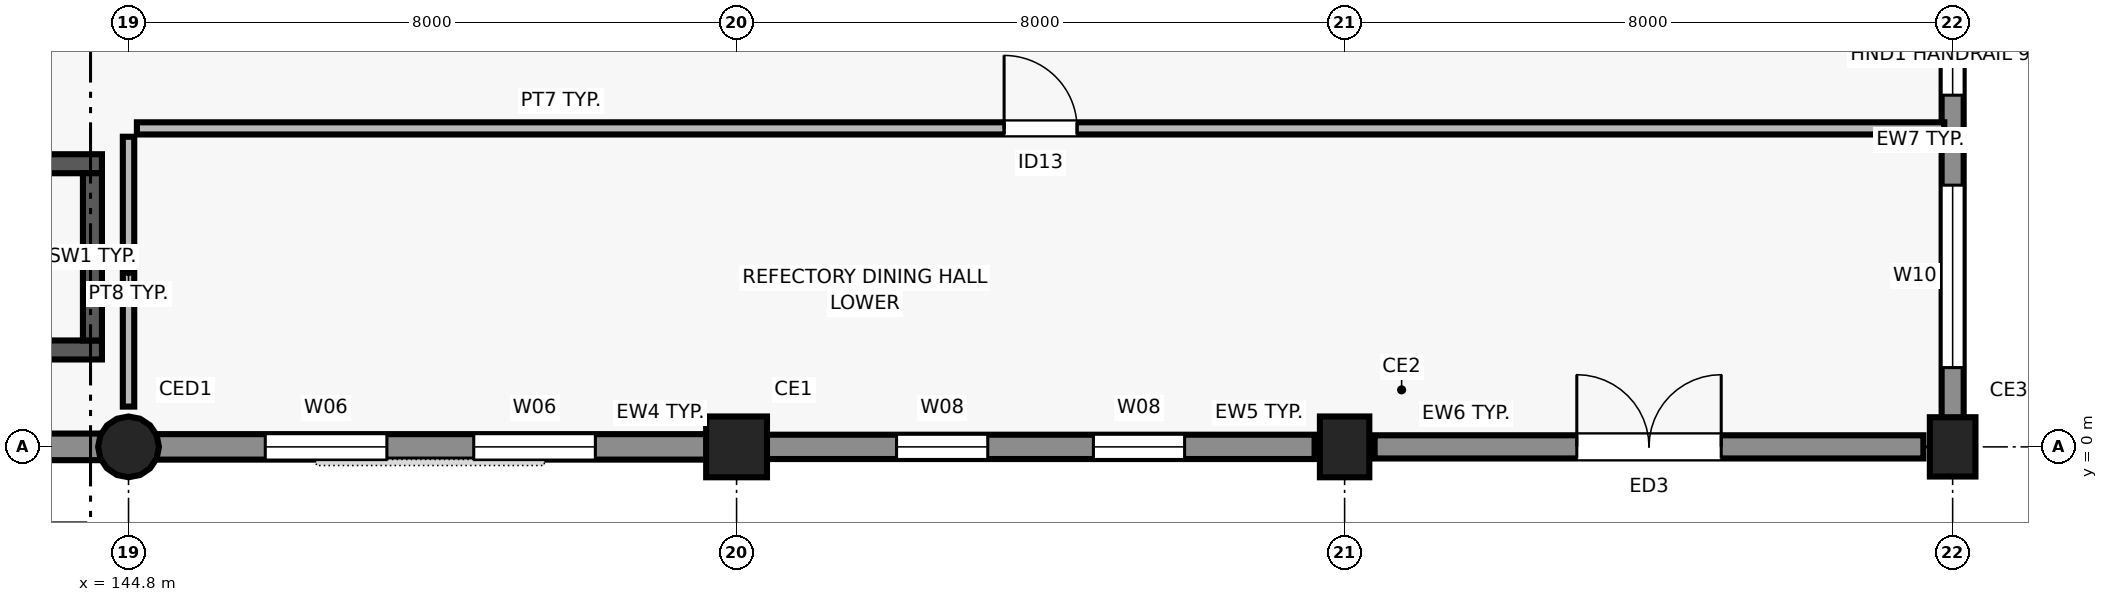
"""IFC4 building model, lengths in metres.
Left out: names, types, materials, properties, quantities, classifications, styles, units other than length and angle.
Written with IfcOpenShell. Run it as: python <this file> out.ifc"""

import sys

from ifc_helpers import new_model, si_unit, direction, frame, frame_2d, origin, origin_2d, place, context, subcontext, project, spatial, rectangle, circle, extrude, element, fill, save


model = new_model("IFC4")
c1 = context("Model", 3, precision=1e-05, world=origin(), true_north=direction((0.0, 1.0)))
c2 = subcontext(c1, "Body", "Model", "MODEL_VIEW")
j1 = project(units=[si_unit("LENGTHUNIT", "METRE"), si_unit("PLANEANGLEUNIT", "RADIAN")], contexts=[c1])
p1 = place(None, origin())
s1 = spatial("IfcSite", under=j1, at=p1, CompositionType="ELEMENT")
p2 = place(p1, origin())
s2 = spatial("IfcBuilding", under=s1, at=p2, CompositionType="ELEMENT")
p3 = place(p2, frame((0.0, 0.0, -4.2)))
s3 = spatial("IfcBuildingStorey", under=s2, at=p3, CompositionType="ELEMENT", Elevation=-4.2)
p4 = place(p3, frame((144.8, 0.0, 0.0), z_axis=(0.0, 0.0, 1.0), x_axis=(1.0, 0.0, 0.0)))
e1 = element("IfcColumn", 1, at=p4, inside=s3, PredefinedType="COLUMN", context=c2, shape_type="SweptSolid", body=[
    extrude(circle(Radius=0.4, at=origin_2d()), origin(), (0.0, 0.0, 1.0), 4.2),
])
p5 = place(p3, frame((152.8, 0.0, 0.0), z_axis=(0.0, 0.0, 1.0), x_axis=(1.0, 0.0, 0.0)))
e2 = element("IfcColumn", 2, at=p5, inside=s3, PredefinedType="COLUMN", context=c2, shape_type="SweptSolid", body=[
    extrude(rectangle(XDim=0.8, YDim=0.8, at=origin_2d()), origin(), (0.0, 0.0, 1.0), 4.2),
])
p6 = place(p3, frame((160.8, 0.0, 0.0), z_axis=(0.0, 0.0, 1.0), x_axis=(1.0, 0.0, 0.0)))
e3 = element("IfcColumn", 3, at=p6, inside=s3, PredefinedType="COLUMN", context=c2, shape_type="SweptSolid", body=[
    extrude(rectangle(XDim=0.8, YDim=0.65, at=origin_2d()), origin(), (0.0, 0.0, 1.0), 4.2),
])
p7 = place(p3, frame((168.8, 0.0, 0.0), z_axis=(0.0, 0.0, 1.0), x_axis=(1.0, 0.0, 0.0)))
e4 = element("IfcColumn", 4, at=p7, inside=s3, PredefinedType="COLUMN", context=c2, shape_type="SweptSolid", body=[
    extrude(rectangle(XDim=0.78, YDim=0.6, at=origin_2d()), origin(), (0.0, 0.0, 1.0), 4.2),
])
p8 = place(p3, frame((137.185, 0.0, 0.0), z_axis=(0.0, 0.0, 1.0), x_axis=(1.0, 0.0, 0.0)))
e5 = element("IfcWall", 5, at=p8, inside=s3, PredefinedType="SOLIDWALL", context=c2, shape_type="SweptSolid", body=[
    extrude(rectangle(XDim=7.279, YDim=0.35, at=frame_2d((3.64, 0.0))), origin(), (0.0, 0.0, 1.0), 3.92),
])
p9 = place(p8, frame((1.2, 0.0, 0.9)))
e6 = element("IfcOpeningElement", 6, at=p9, cuts=e5, PredefinedType="OPENING", context=c2, shape_type="SweptSolid", body=[
    extrude(rectangle(XDim=2.0, YDim=1.8, at=frame_2d((1.0, 0.9))), frame((0.0, 0.185, 0.0), z_axis=(0.0, -1.0, 0.0), x_axis=(1.0, 0.0, 0.0)), (0.0, 0.0, 1.0), 0.37),
])
p10 = place(p8, frame((4.079, 0.0, 0.9)))
e7 = element("IfcOpeningElement", 7, at=p10, cuts=e5, PredefinedType="OPENING", context=c2, shape_type="SweptSolid", body=[
    extrude(rectangle(XDim=2.0, YDim=1.8, at=frame_2d((1.0, 0.9))), frame((0.0, 0.185, 0.0), z_axis=(0.0, -1.0, 0.0), x_axis=(1.0, 0.0, 0.0)), (0.0, 0.0, 1.0), 0.37),
])
p11 = place(p3, frame((145.136, 0.0, 0.0), z_axis=(0.0, 0.0, 1.0), x_axis=(1.0, 0.0, 0.0)))
e8 = element("IfcWall", 8, at=p11, inside=s3, PredefinedType="SOLIDWALL", context=c2, shape_type="SweptSolid", body=[
    extrude(rectangle(XDim=7.269, YDim=0.335, at=frame_2d((3.635, 0.0))), origin(), (0.0, 0.0, 1.0), 3.115),
])
p12 = place(p11, frame((1.463, 0.0, 0.9)))
e9 = element("IfcOpeningElement", 9, at=p12, cuts=e8, PredefinedType="OPENING", context=c2, shape_type="SweptSolid", body=[
    extrude(rectangle(XDim=1.6, YDim=1.8, at=frame_2d((0.8, 0.9))), frame((0.0, 0.177, 0.0), z_axis=(0.0, -1.0, 0.0), x_axis=(1.0, 0.0, 0.0)), (0.0, 0.0, 1.0), 0.355),
])
p13 = place(p11, frame((4.206, 0.0, 0.9)))
e10 = element("IfcOpeningElement", 10, at=p13, cuts=e8, PredefinedType="OPENING", context=c2, shape_type="SweptSolid", body=[
    extrude(rectangle(XDim=1.6, YDim=1.8, at=frame_2d((0.8, 0.9))), frame((0.0, 0.177, 0.0), z_axis=(0.0, -1.0, 0.0), x_axis=(1.0, 0.0, 0.0)), (0.0, 0.0, 1.0), 0.355),
])
p14 = place(p3, frame((153.195, 0.0, 0.0), z_axis=(0.0, 0.0, 1.0), x_axis=(1.0, 0.0, 0.0)))
e11 = element("IfcWall", 11, at=p14, inside=s3, PredefinedType="SOLIDWALL", context=c2, shape_type="SweptSolid", body=[
    extrude(rectangle(XDim=7.21, YDim=0.32, at=frame_2d((3.605, 0.0))), origin(), (0.0, 0.0, 1.0), 3.245),
])
p15 = place(p14, frame((1.71, 0.0, 0.9)))
e12 = element("IfcOpeningElement", 12, at=p15, cuts=e11, PredefinedType="OPENING", context=c2, shape_type="SweptSolid", body=[
    extrude(rectangle(XDim=1.2, YDim=1.8, at=frame_2d((0.6, 0.9))), frame((0.0, 0.17, 0.0), z_axis=(0.0, -1.0, 0.0), x_axis=(1.0, 0.0, 0.0)), (0.0, 0.0, 1.0), 0.34),
])
p16 = place(p14, frame((4.3, 0.0, 0.9)))
e13 = element("IfcOpeningElement", 13, at=p16, cuts=e11, PredefinedType="OPENING", context=c2, shape_type="SweptSolid", body=[
    extrude(rectangle(XDim=1.2, YDim=1.8, at=frame_2d((0.6, 0.9))), frame((0.0, 0.17, 0.0), z_axis=(0.0, -1.0, 0.0), x_axis=(1.0, 0.0, 0.0)), (0.0, 0.0, 1.0), 0.34),
])
p17 = place(p3, frame((161.195, 0.0, 0.0), z_axis=(0.0, 0.0, 1.0), x_axis=(1.0, 0.0, 0.0)))
e14 = element("IfcWall", 14, at=p17, inside=s3, PredefinedType="SOLIDWALL", context=c2, shape_type="SweptSolid", body=[
    extrude(rectangle(XDim=7.22, YDim=0.305, at=frame_2d((3.61, 0.0))), origin(), (0.0, 0.0, 1.0), 3.115),
])
p18 = place(p17, frame((2.66, 0.0, 0.0)))
e15 = element("IfcOpeningElement", 15, at=p18, cuts=e14, PredefinedType="OPENING", context=c2, shape_type="SweptSolid", body=[
    extrude(rectangle(XDim=1.9, YDim=2.35, at=frame_2d((0.95, 1.175))), frame((0.0, 0.162, 0.0), z_axis=(0.0, -1.0, 0.0), x_axis=(1.0, 0.0, 0.0)), (0.0, 0.0, 1.0), 0.325),
])
p19 = place(p3, frame((168.8, 0.295, 0.0), z_axis=(0.0, 0.0, 1.0), x_axis=(0.0, 1.0, 0.0)))
e16 = element("IfcWall", 16, at=p19, inside=s3, PredefinedType="SOLIDWALL", context=c2, shape_type="SweptSolid", body=[
    extrude(rectangle(XDim=6.969, YDim=0.29, at=frame_2d((3.484, 0.0))), origin(), (0.0, 0.0, 1.0), 3.355),
])
p20 = place(p19, frame((0.748, 0.0, 0.9)))
e17 = element("IfcOpeningElement", 17, at=p20, cuts=e16, PredefinedType="OPENING", context=c2, shape_type="SweptSolid", body=[
    extrude(rectangle(XDim=2.4, YDim=1.5, at=frame_2d((1.2, 0.75))), frame((0.0, 0.155, 0.0), z_axis=(0.0, -1.0, 0.0), x_axis=(1.0, 0.0, 0.0)), (0.0, 0.0, 1.0), 0.31),
])
p21 = place(p19, frame((4.332, 0.0, 0.9)))
e18 = element("IfcOpeningElement", 18, at=p21, cuts=e16, PredefinedType="OPENING", context=c2, shape_type="SweptSolid", body=[
    extrude(rectangle(XDim=2.2, YDim=1.5, at=frame_2d((1.1, 0.75))), frame((0.0, 0.155, 0.0), z_axis=(0.0, -1.0, 0.0), x_axis=(1.0, 0.0, 0.0)), (0.0, 0.0, 1.0), 0.31),
])
p22 = place(p3, frame((141.95, 1.275, 0.0), z_axis=(0.0, 0.0, 1.0), x_axis=(1.0, 0.0, 0.0)))
e19 = element("IfcWall", 19, at=p22, inside=s3, PredefinedType="SHEAR", context=c2, shape_type="SweptSolid", body=[
    extrude(rectangle(XDim=2.5, YDim=0.25, at=frame_2d((1.25, 0.0))), origin(), (0.0, 0.0, 1.0), 3.92),
])
p23 = place(p3, frame((141.95, 3.725, 0.0), z_axis=(0.0, 0.0, 1.0), x_axis=(1.0, 0.0, 0.0)))
e20 = element("IfcWall", 20, at=p23, inside=s3, PredefinedType="SHEAR", context=c2, shape_type="SweptSolid", body=[
    extrude(rectangle(XDim=2.5, YDim=0.25, at=frame_2d((1.25, 0.0))), origin(), (0.0, 0.0, 1.0), 3.92),
])
p24 = place(p23, frame((0.8, 0.0, 0.0)))
e21 = element("IfcOpeningElement", 21, at=p24, cuts=e20, PredefinedType="OPENING", context=c2, shape_type="SweptSolid", body=[
    extrude(rectangle(XDim=0.9, YDim=2.05, at=frame_2d((0.45, 1.025))), frame((0.0, 0.135, 0.0), z_axis=(0.0, -1.0, 0.0), x_axis=(1.0, 0.0, 0.0)), (0.0, 0.0, 1.0), 0.27),
])
p25 = place(p3, frame((144.325, 1.4, 0.0), z_axis=(0.0, 0.0, 1.0), x_axis=(0.0, 1.0, 0.0)))
e22 = element("IfcWall", 22, at=p25, inside=s3, PredefinedType="SHEAR", context=c2, shape_type="SweptSolid", body=[
    extrude(rectangle(XDim=2.2, YDim=0.25, at=frame_2d((1.1, 0.0))), origin(), (0.0, 0.0, 1.0), 3.92),
])
p26 = place(p3, frame((144.91, 4.19, 0.0), z_axis=(0.0, 0.0, 1.0), x_axis=(1.0, 0.0, 0.0)))
e23 = element("IfcWall", 23, at=p26, inside=s3, PredefinedType="PARTITIONING", context=c2, shape_type="SweptSolid", body=[
    extrude(rectangle(XDim=23.78, YDim=0.16, at=frame_2d((11.89, 0.0))), origin(), (0.0, 0.0, 1.0), 3.9),
])
p27 = place(p26, frame((11.41, 0.0, 0.0)))
e24 = element("IfcOpeningElement", 24, at=p27, cuts=e23, PredefinedType="OPENING", context=c2, shape_type="SweptSolid", body=[
    extrude(rectangle(XDim=0.96, YDim=2.15, at=frame_2d((0.48, 1.075))), frame((0.0, 0.09, 0.0), z_axis=(0.0, -1.0, 0.0), x_axis=(1.0, 0.0, 0.0)), (0.0, 0.0, 1.0), 0.18),
])
p28 = place(p3, frame((144.8, 0.53, 0.0), z_axis=(0.0, 0.0, 1.0), x_axis=(0.0, 1.0, 0.0)))
e25 = element("IfcWall", 25, at=p28, inside=s3, PredefinedType="PARTITIONING", context=c2, shape_type="SweptSolid", body=[
    extrude(rectangle(XDim=3.55, YDim=0.15, at=frame_2d((1.775, 0.0))), origin(), (0.0, 0.0, 1.0), 3.345),
])
p29 = place(p12, origin())
e26 = element("IfcWindow", 26, at=p29, inside=s3, PartitioningType="SINGLE_PANEL", PredefinedType="WINDOW", context=c2, shape_type="SweptSolid", body=[
    extrude(rectangle(XDim=1.6, YDim=1.8, at=frame_2d((0.8, 0.9))), frame((0.0, 0.03, 0.0), z_axis=(0.0, -1.0, 0.0), x_axis=(1.0, 0.0, 0.0)), (0.0, 0.0, 1.0), 0.06),
])
fill(e9, e26)
p30 = place(p13, origin())
e27 = element("IfcWindow", 27, at=p30, inside=s3, PartitioningType="SINGLE_PANEL", PredefinedType="WINDOW", context=c2, shape_type="SweptSolid", body=[
    extrude(rectangle(XDim=1.6, YDim=1.8, at=frame_2d((0.8, 0.9))), frame((0.0, 0.03, 0.0), z_axis=(0.0, -1.0, 0.0), x_axis=(1.0, 0.0, 0.0)), (0.0, 0.0, 1.0), 0.06),
])
fill(e10, e27)
p31 = place(p15, origin())
e28 = element("IfcWindow", 28, at=p31, inside=s3, PartitioningType="SINGLE_PANEL", PredefinedType="WINDOW", context=c2, shape_type="SweptSolid", body=[
    extrude(rectangle(XDim=1.2, YDim=1.8, at=frame_2d((0.6, 0.9))), frame((0.0, 0.03, 0.0), z_axis=(0.0, -1.0, 0.0), x_axis=(1.0, 0.0, 0.0)), (0.0, 0.0, 1.0), 0.06),
])
fill(e12, e28)
p32 = place(p16, origin())
e29 = element("IfcWindow", 29, at=p32, inside=s3, PartitioningType="SINGLE_PANEL", PredefinedType="WINDOW", context=c2, shape_type="SweptSolid", body=[
    extrude(rectangle(XDim=1.2, YDim=1.8, at=frame_2d((0.6, 0.9))), frame((0.0, 0.03, 0.0), z_axis=(0.0, -1.0, 0.0), x_axis=(1.0, 0.0, 0.0)), (0.0, 0.0, 1.0), 0.06),
])
fill(e13, e29)
p33 = place(p18, frame((1.9, 0.0, 0.0), z_axis=(0.0, 0.0, 1.0), x_axis=(-1.0, 0.0, 0.0)))
e30 = element("IfcDoor", 30, at=p33, inside=s3, OperationType="DOUBLE_DOOR_SINGLE_SWING", PredefinedType="DOOR", context=c2, shape_type="SweptSolid", body=[
    extrude(rectangle(XDim=1.9, YDim=2.35, at=frame_2d((0.95, 1.175))), frame((0.0, 0.025, 0.0), z_axis=(0.0, -1.0, 0.0), x_axis=(1.0, 0.0, 0.0)), (0.0, 0.0, 1.0), 0.05),
])
fill(e15, e30)
p34 = place(p20, origin())
e31 = element("IfcWindow", 31, at=p34, inside=s3, PartitioningType="SINGLE_PANEL", PredefinedType="WINDOW", context=c2, shape_type="SweptSolid", body=[
    extrude(rectangle(XDim=2.4, YDim=1.5, at=frame_2d((1.2, 0.75))), frame((0.0, 0.03, 0.0), z_axis=(0.0, -1.0, 0.0), x_axis=(1.0, 0.0, 0.0)), (0.0, 0.0, 1.0), 0.06),
])
fill(e17, e31)
p35 = place(p21, origin())
e32 = element("IfcWindow", 32, at=p35, inside=s3, PartitioningType="SINGLE_PANEL", PredefinedType="WINDOW", context=c2, shape_type="SweptSolid", body=[
    extrude(rectangle(XDim=2.2, YDim=1.5, at=frame_2d((1.1, 0.75))), frame((0.0, 0.03, 0.0), z_axis=(0.0, -1.0, 0.0), x_axis=(1.0, 0.0, 0.0)), (0.0, 0.0, 1.0), 0.06),
])
fill(e18, e32)
p36 = place(p27, origin())
e33 = element("IfcDoor", 33, at=p36, inside=s3, OperationType="SINGLE_SWING_LEFT", PredefinedType="DOOR", context=c2, shape_type="SweptSolid", body=[
    extrude(rectangle(XDim=0.96, YDim=2.15, at=frame_2d((0.48, 1.075))), frame((0.0, 0.025, 0.0), z_axis=(0.0, -1.0, 0.0), x_axis=(1.0, 0.0, 0.0)), (0.0, 0.0, 1.0), 0.05),
])
fill(e24, e33)
save(model, sys.argv[1])
